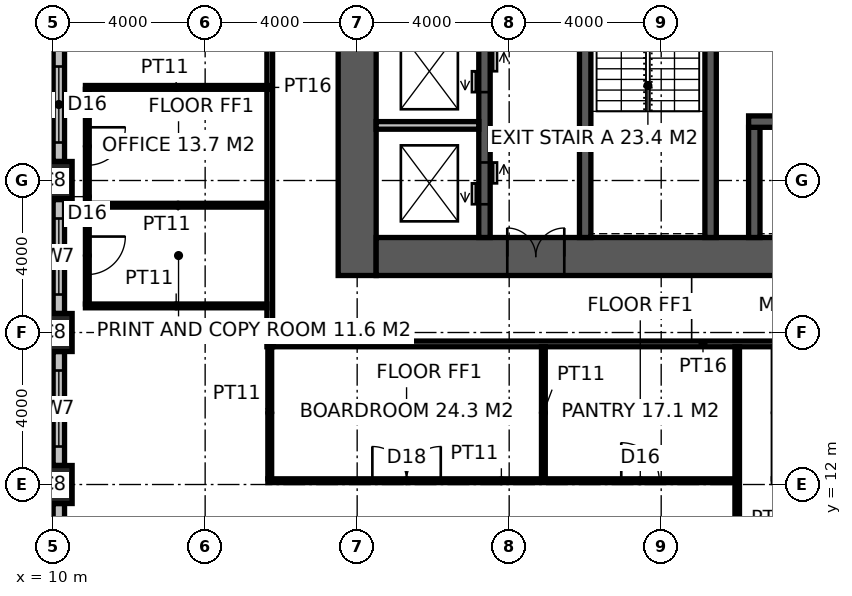
"""IFC4 building model, lengths in metres.
Left out: names, types, materials, properties, quantities, classifications, styles, units other than length and angle.
Written with IfcOpenShell. Run it as: python <this file> out.ifc"""

import sys

from ifc_helpers import new_model, si_unit, direction, frame, frame_2d, origin, origin_2d, place, context, subcontext, project, spatial, rectangle, hollow_rectangle, extrude, element, fill, save


model = new_model("IFC4")
c1 = context("Model", 3, precision=1e-05, world=origin(), true_north=direction((0.0, 1.0)))
c2 = subcontext(c1, "Body", "Model", "MODEL_VIEW")
j1 = project(units=[si_unit("LENGTHUNIT", "METRE"), si_unit("PLANEANGLEUNIT", "RADIAN")], contexts=[c1])
p1 = place(None, origin())
s1 = spatial("IfcSite", under=j1, at=p1, CompositionType="ELEMENT")
p2 = place(p1, origin())
s2 = spatial("IfcBuilding", under=s1, at=p2, CompositionType="ELEMENT")
p3 = place(p2, frame((0.0, 0.0, 266.2)))
s3 = spatial("IfcBuildingStorey", under=s2, at=p3, CompositionType="ELEMENT", Elevation=266.2)
for number, where, z_axis, x_axis in (
    (1, (10.0, 12.0, 0.0), (0.0, 0.0, 1.0), (1.0, 0.0, 0.0)),
    (2, (10.0, 16.0, 0.0), (0.0, 0.0, 1.0), (1.0, 0.0, 0.0)),
    (3, (10.0, 20.0, 0.0), (0.0, 0.0, 1.0), (1.0, 0.0, 0.0)),
):
    element("IfcColumn", number, at=place(p3, frame(where, z_axis=z_axis, x_axis=x_axis)), inside=s3, PredefinedType="COLUMN", context=c2, shape_type="SweptSolid", body=[
        extrude(hollow_rectangle(XDim=1.0, YDim=1.0, WallThickness=0.125, at=origin_2d()), origin(), (0.0, 0.0, 1.0), 4.0),
    ])
p4 = place(p3, frame((18.0, 17.5, -0.15), z_axis=(0.0, 0.0, 1.0), x_axis=(0.0, 1.0, 0.0)))
e4 = element("IfcWall", 4, at=p4, inside=s3, PredefinedType="SHEAR", context=c2, shape_type="SweptSolid", body=[
    extrude(rectangle(XDim=19.0, YDim=1.0, at=frame_2d((9.5, 0.0))), origin(), (0.0, 0.0, 1.0), 4.0),
])
p5 = place(p3, frame((18.5, 18.0, -0.15), z_axis=(0.0, 0.0, 1.0), x_axis=(1.0, 0.0, 0.0)))
e5 = element("IfcWall", 5, at=p5, inside=s3, PredefinedType="SHEAR", context=c2, shape_type="SweptSolid", body=[
    extrude(rectangle(XDim=17.6, YDim=1.0, at=frame_2d((8.8, 0.0))), origin(), (0.0, 0.0, 1.0), 4.0),
])
p6 = place(p5, frame((3.45, 0.0, 0.15)))
e6 = element("IfcOpeningElement", 6, at=p6, cuts=e5, PredefinedType="OPENING", context=c2, shape_type="SweptSolid", body=[
    extrude(rectangle(XDim=1.5, YDim=2.4, at=frame_2d((0.75, 1.2))), frame((0.0, 0.51, 0.0), z_axis=(0.0, -1.0, 0.0), x_axis=(1.0, 0.0, 0.0)), (0.0, 0.0, 1.0), 1.02),
])
p7 = place(p3, frame((24.0, 18.5, -0.15), z_axis=(0.0, 0.0, 1.0), x_axis=(0.0, 1.0, 0.0)))
e7 = element("IfcWall", 7, at=p7, inside=s3, PredefinedType="SHEAR", context=c2, shape_type="SweptSolid", body=[
    extrude(rectangle(XDim=17.0, YDim=0.3, at=frame_2d((8.5, 0.0))), origin(), (0.0, 0.0, 1.0), 4.0),
])
p8 = place(p7, frame((9.6, 0.0, 0.15)))
e8 = element("IfcOpeningElement", 8, at=p8, cuts=e7, PredefinedType="OPENING", context=c2, shape_type="SweptSolid", body=[
    extrude(rectangle(XDim=1.5, YDim=2.4, at=frame_2d((0.75, 1.2))), frame((0.0, 0.16, 0.0), z_axis=(0.0, -1.0, 0.0), x_axis=(1.0, 0.0, 0.0)), (0.0, 0.0, 1.0), 0.32),
])
p9 = place(p3, frame((27.3, 18.5, -0.15), z_axis=(0.0, 0.0, 1.0), x_axis=(0.0, 1.0, 0.0)))
e9 = element("IfcWall", 9, at=p9, inside=s3, PredefinedType="SHEAR", context=c2, shape_type="SweptSolid", body=[
    extrude(rectangle(XDim=7.9, YDim=0.3, at=frame_2d((3.95, 0.0))), origin(), (0.0, 0.0, 1.0), 4.0),
])
p10 = place(p9, frame((6.4, 0.0, 0.15)))
e10 = element("IfcOpeningElement", 10, at=p10, cuts=e9, PredefinedType="OPENING", context=c2, shape_type="SweptSolid", body=[
    extrude(rectangle(XDim=1.0, YDim=2.2, at=frame_2d((0.5, 1.1))), frame((0.0, 0.16, 0.0), z_axis=(0.0, -1.0, 0.0), x_axis=(1.0, 0.0, 0.0)), (0.0, 0.0, 1.0), 0.32),
])
p11 = place(p3, frame((28.45, 18.5, -0.15), z_axis=(0.0, 0.0, 1.0), x_axis=(0.0, 1.0, 0.0)))
e11 = element("IfcWall", 11, at=p11, inside=s3, PredefinedType="SHEAR", context=c2, shape_type="SweptSolid", body=[
    extrude(rectangle(XDim=2.9, YDim=0.3, at=frame_2d((1.45, 0.0))), origin(), (0.0, 0.0, 1.0), 4.0),
])
p12 = place(p3, frame((28.3, 21.55, -0.15), z_axis=(0.0, 0.0, 1.0), x_axis=(1.0, 0.0, 0.0)))
e12 = element("IfcWall", 12, at=p12, inside=s3, PredefinedType="SHEAR", context=c2, shape_type="SweptSolid", body=[
    extrude(rectangle(XDim=3.8, YDim=0.3, at=frame_2d((1.9, 0.0))), origin(), (0.0, 0.0, 1.0), 4.0),
])
p13 = place(p12, frame((1.05, 0.0, 0.15)))
e13 = element("IfcOpeningElement", 13, at=p13, cuts=e12, PredefinedType="OPENING", context=c2, shape_type="SweptSolid", body=[
    extrude(rectangle(XDim=1.3, YDim=2.4, at=frame_2d((0.65, 1.2))), frame((0.0, 0.16, 0.0), z_axis=(0.0, -1.0, 0.0), x_axis=(1.0, 0.0, 0.0)), (0.0, 0.0, 1.0), 0.32),
])
p14 = place(p3, frame((21.35, 18.5, -0.15), z_axis=(0.0, 0.0, 1.0), x_axis=(0.0, 1.0, 0.0)))
e14 = element("IfcWall", 14, at=p14, inside=s3, PredefinedType="SHEAR", context=c2, shape_type="SweptSolid", body=[
    extrude(rectangle(XDim=12.5, YDim=0.3, at=frame_2d((6.25, 0.0))), origin(), (0.0, 0.0, 1.0), 4.0),
])
p15 = place(p14, frame((0.875, 0.0, 0.15)))
e15 = element("IfcOpeningElement", 15, at=p15, cuts=e14, PredefinedType="OPENING", context=c2, shape_type="SweptSolid", body=[
    extrude(rectangle(XDim=1.1, YDim=2.2, at=frame_2d((0.55, 1.1))), frame((0.0, 0.16, 0.0), z_axis=(0.0, -1.0, 0.0), x_axis=(1.0, 0.0, 0.0)), (0.0, 0.0, 1.0), 0.32),
])
p16 = place(p14, frame((3.825, 0.0, 0.15)))
e16 = element("IfcOpeningElement", 16, at=p16, cuts=e14, PredefinedType="OPENING", context=c2, shape_type="SweptSolid", body=[
    extrude(rectangle(XDim=1.1, YDim=2.2, at=frame_2d((0.55, 1.1))), frame((0.0, 0.16, 0.0), z_axis=(0.0, -1.0, 0.0), x_axis=(1.0, 0.0, 0.0)), (0.0, 0.0, 1.0), 0.32),
])
p17 = place(p14, frame((6.675, 0.0, 0.15)))
e17 = element("IfcOpeningElement", 17, at=p17, cuts=e14, PredefinedType="OPENING", context=c2, shape_type="SweptSolid", body=[
    extrude(rectangle(XDim=1.1, YDim=2.2, at=frame_2d((0.55, 1.1))), frame((0.0, 0.16, 0.0), z_axis=(0.0, -1.0, 0.0), x_axis=(1.0, 0.0, 0.0)), (0.0, 0.0, 1.0), 0.32),
])
p18 = place(p14, frame((9.575, 0.0, 0.15)))
e18 = element("IfcOpeningElement", 18, at=p18, cuts=e14, PredefinedType="OPENING", context=c2, shape_type="SweptSolid", body=[
    extrude(rectangle(XDim=1.1, YDim=2.2, at=frame_2d((0.55, 1.1))), frame((0.0, 0.16, 0.0), z_axis=(0.0, -1.0, 0.0), x_axis=(1.0, 0.0, 0.0)), (0.0, 0.0, 1.0), 0.32),
])
p19 = place(p3, frame((18.5, 21.45, -0.15), z_axis=(0.0, 0.0, 1.0), x_axis=(1.0, 0.0, 0.0)))
e19 = element("IfcWall", 19, at=p19, inside=s3, PredefinedType="SOLIDWALL", context=c2, shape_type="SweptSolid", body=[
    extrude(rectangle(XDim=2.7, YDim=0.2, at=frame_2d((1.35, 0.0))), origin(), (0.0, 0.0, 1.0), 4.0),
])
p20 = place(p3, frame((15.7, 15.625, 0.0), z_axis=(0.0, 0.0, 1.0), x_axis=(0.0, 1.0, 0.0)))
e20 = element("IfcWall", 20, at=p20, inside=s3, PredefinedType="PARTITIONING", context=c2, shape_type="SweptSolid", body=[
    extrude(rectangle(XDim=22.75, YDim=0.15, at=frame_2d((11.375, 0.0))), origin(), (0.0, 0.0, 1.0), 3.85),
])
p21 = place(p20, frame((10.475, 0.0, 0.0)))
e21 = element("IfcOpeningElement", 21, at=p21, cuts=e20, PredefinedType="OPENING", context=c2, shape_type="SweptSolid", body=[
    extrude(rectangle(XDim=1.8, YDim=2.4, at=frame_2d((0.9, 1.2))), frame((0.0, 0.085, 0.0), z_axis=(0.0, -1.0, 0.0), x_axis=(1.0, 0.0, 0.0)), (0.0, 0.0, 1.0), 0.17),
])
p22 = place(p3, frame((15.775, 15.7, 0.0), z_axis=(0.0, 0.0, 1.0), x_axis=(1.0, 0.0, 0.0)))
e22 = element("IfcWall", 22, at=p22, inside=s3, PredefinedType="PARTITIONING", context=c2, shape_type="SweptSolid", body=[
    extrude(rectangle(XDim=22.65, YDim=0.15, at=frame_2d((11.325, 0.0))), origin(), (0.0, 0.0, 1.0), 3.85),
])
p23 = place(p3, frame((28.0, 4.3, 0.0), z_axis=(0.0, 0.0, 1.0), x_axis=(0.0, 1.0, 0.0)))
e23 = element("IfcWall", 23, at=p23, inside=s3, PredefinedType="PARTITIONING", context=c2, shape_type="SweptSolid", body=[
    extrude(rectangle(XDim=11.325, YDim=0.12, at=frame_2d((5.663, 0.0))), origin(), (0.0, 0.0, 1.0), 3.85),
])
p24 = place(p3, frame((15.65, 12.1, 0.0), z_axis=(0.0, 0.0, 1.0), x_axis=(1.0, 0.0, 0.0)))
e24 = element("IfcWall", 24, at=p24, inside=s3, PredefinedType="PARTITIONING", context=c2, shape_type="SweptSolid", body=[
    extrude(rectangle(XDim=12.289, YDim=0.1, at=frame_2d((6.145, 0.0))), origin(), (0.0, 0.0, 1.0), 3.85),
])
p25 = place(p24, frame((2.75, 0.0, 0.0)))
e25 = element("IfcOpeningElement", 25, at=p25, cuts=e24, PredefinedType="OPENING", context=c2, shape_type="SweptSolid", body=[
    extrude(rectangle(XDim=1.8, YDim=2.4, at=frame_2d((0.9, 1.2))), frame((0.0, 0.06, 0.0), z_axis=(0.0, -1.0, 0.0), x_axis=(1.0, 0.0, 0.0)), (0.0, 0.0, 1.0), 0.12),
])
p26 = place(p24, frame((9.3, 0.0, 0.0)))
e26 = element("IfcOpeningElement", 26, at=p26, cuts=e24, PredefinedType="OPENING", context=c2, shape_type="SweptSolid", body=[
    extrude(rectangle(XDim=1.0, YDim=2.2, at=frame_2d((0.5, 1.1))), frame((0.0, 0.06, 0.0), z_axis=(0.0, -1.0, 0.0), x_axis=(1.0, 0.0, 0.0)), (0.0, 0.0, 1.0), 0.12),
])
p27 = place(p3, frame((10.85, 16.7, 0.0), z_axis=(0.0, 0.0, 1.0), x_axis=(1.0, 0.0, 0.0)))
e27 = element("IfcWall", 27, at=p27, inside=s3, PredefinedType="PARTITIONING", context=c2, shape_type="SweptSolid", body=[
    extrude(rectangle(XDim=4.775, YDim=0.1, at=frame_2d((2.387, 0.0))), origin(), (0.0, 0.0, 1.0), 3.85),
])
p28 = place(p3, frame((10.95, 19.35, 0.0), z_axis=(0.0, 0.0, 1.0), x_axis=(1.0, 0.0, 0.0)))
e28 = element("IfcWall", 28, at=p28, inside=s3, PredefinedType="PARTITIONING", context=c2, shape_type="SweptSolid", body=[
    extrude(rectangle(XDim=4.675, YDim=0.1, at=frame_2d((2.337, 0.0))), origin(), (0.0, 0.0, 1.0), 3.85),
])
p29 = place(p3, frame((10.85, 22.45, 0.0), z_axis=(0.0, 0.0, 1.0), x_axis=(1.0, 0.0, 0.0)))
e29 = element("IfcWall", 29, at=p29, inside=s3, PredefinedType="PARTITIONING", context=c2, shape_type="SweptSolid", body=[
    extrude(rectangle(XDim=4.775, YDim=0.1, at=frame_2d((2.387, 0.0))), origin(), (0.0, 0.0, 1.0), 3.85),
])
p30 = place(p3, frame((10.9, 16.75, 0.0), z_axis=(0.0, 0.0, 1.0), x_axis=(0.0, 1.0, 0.0)))
e30 = element("IfcWall", 30, at=p30, inside=s3, PredefinedType="PARTITIONING", context=c2, shape_type="SweptSolid", body=[
    extrude(rectangle(XDim=5.65, YDim=0.1, at=frame_2d((2.825, 0.0))), origin(), (0.0, 0.0, 1.0), 3.85),
])
p31 = place(p30, frame((0.775, 0.0, 0.0)))
e31 = element("IfcOpeningElement", 31, at=p31, cuts=e30, PredefinedType="OPENING", context=c2, shape_type="SweptSolid", body=[
    extrude(rectangle(XDim=1.0, YDim=2.2, at=frame_2d((0.5, 1.1))), frame((0.0, 0.06, 0.0), z_axis=(0.0, -1.0, 0.0), x_axis=(1.0, 0.0, 0.0)), (0.0, 0.0, 1.0), 0.12),
])
p32 = place(p30, frame((3.65, 0.0, 0.0)))
e32 = element("IfcOpeningElement", 32, at=p32, cuts=e30, PredefinedType="OPENING", context=c2, shape_type="SweptSolid", body=[
    extrude(rectangle(XDim=1.0, YDim=2.2, at=frame_2d((0.5, 1.1))), frame((0.0, 0.06, 0.0), z_axis=(0.0, -1.0, 0.0), x_axis=(1.0, 0.0, 0.0)), (0.0, 0.0, 1.0), 0.12),
])
for number, where, z_axis, x_axis in (
    (33, (15.7, 12.15, 0.0), (0.0, 0.0, 1.0), (0.0, 1.0, 0.0)),
    (34, (22.9, 12.15, 0.0), (0.0, 0.0, 1.0), (0.0, 1.0, 0.0)),
):
    element("IfcWall", number, at=place(p3, frame(where, z_axis=z_axis, x_axis=x_axis)), inside=s3, PredefinedType="PARTITIONING", context=c2, shape_type="SweptSolid", body=[
        extrude(rectangle(XDim=3.475, YDim=0.1, at=frame_2d((1.738, 0.0))), origin(), (0.0, 0.0, 1.0), 3.85),
    ])
p33 = place(p3, frame((10.15, 11.5, 0.0), z_axis=(0.0, 0.0, 1.0), x_axis=(0.0, -1.0, 0.0)))
e35 = element("IfcWall", 35, at=p33, inside=s3, PredefinedType="ELEMENTEDWALL", context=c2, shape_type="SweptSolid", body=[
    extrude(rectangle(XDim=3.0, YDim=0.3, at=frame_2d((1.5, 0.0))), origin(), (0.0, 0.0, 1.0), 2.65),
])
p34 = place(p33, frame((0.5, 0.0, 0.8)))
e36 = element("IfcOpeningElement", 36, at=p34, cuts=e35, PredefinedType="OPENING", context=c2, shape_type="SweptSolid", body=[
    extrude(rectangle(XDim=2.0, YDim=1.8, at=frame_2d((1.0, 0.9))), frame((0.0, 0.16, 0.0), z_axis=(0.0, -1.0, 0.0), x_axis=(1.0, 0.0, 0.0)), (0.0, 0.0, 1.0), 0.32),
])
p35 = place(p3, frame((10.15, 15.5, 0.0), z_axis=(0.0, 0.0, 1.0), x_axis=(0.0, -1.0, 0.0)))
e37 = element("IfcWall", 37, at=p35, inside=s3, PredefinedType="ELEMENTEDWALL", context=c2, shape_type="SweptSolid", body=[
    extrude(rectangle(XDim=3.0, YDim=0.3, at=frame_2d((1.5, 0.0))), origin(), (0.0, 0.0, 1.0), 2.65),
])
p36 = place(p35, frame((0.5, 0.0, 0.8)))
e38 = element("IfcOpeningElement", 38, at=p36, cuts=e37, PredefinedType="OPENING", context=c2, shape_type="SweptSolid", body=[
    extrude(rectangle(XDim=2.0, YDim=1.8, at=frame_2d((1.0, 0.9))), frame((0.0, 0.16, 0.0), z_axis=(0.0, -1.0, 0.0), x_axis=(1.0, 0.0, 0.0)), (0.0, 0.0, 1.0), 0.32),
])
p37 = place(p3, frame((10.15, 19.5, 0.0), z_axis=(0.0, 0.0, 1.0), x_axis=(0.0, -1.0, 0.0)))
e39 = element("IfcWall", 39, at=p37, inside=s3, PredefinedType="ELEMENTEDWALL", context=c2, shape_type="SweptSolid", body=[
    extrude(rectangle(XDim=3.0, YDim=0.3, at=frame_2d((1.5, 0.0))), origin(), (0.0, 0.0, 1.0), 2.65),
])
p38 = place(p37, frame((0.5, 0.0, 0.8)))
e40 = element("IfcOpeningElement", 40, at=p38, cuts=e39, PredefinedType="OPENING", context=c2, shape_type="SweptSolid", body=[
    extrude(rectangle(XDim=2.0, YDim=1.8, at=frame_2d((1.0, 0.9))), frame((0.0, 0.16, 0.0), z_axis=(0.0, -1.0, 0.0), x_axis=(1.0, 0.0, 0.0)), (0.0, 0.0, 1.0), 0.32),
])
p39 = place(p3, frame((10.15, 23.5, 0.0), z_axis=(0.0, 0.0, 1.0), x_axis=(0.0, -1.0, 0.0)))
e41 = element("IfcWall", 41, at=p39, inside=s3, PredefinedType="ELEMENTEDWALL", context=c2, shape_type="SweptSolid", body=[
    extrude(rectangle(XDim=3.0, YDim=0.3, at=frame_2d((1.5, 0.0))), origin(), (0.0, 0.0, 1.0), 2.65),
])
p40 = place(p39, frame((0.5, 0.0, 0.8)))
e42 = element("IfcOpeningElement", 42, at=p40, cuts=e41, PredefinedType="OPENING", context=c2, shape_type="SweptSolid", body=[
    extrude(rectangle(XDim=2.0, YDim=1.8, at=frame_2d((1.0, 0.9))), frame((0.0, 0.16, 0.0), z_axis=(0.0, -1.0, 0.0), x_axis=(1.0, 0.0, 0.0)), (0.0, 0.0, 1.0), 0.32),
])
p41 = place(p6, origin())
e43 = element("IfcDoor", 43, at=p41, inside=s3, OperationType="DOUBLE_DOOR_DOUBLE_SWING", PredefinedType="DOOR", context=c2, shape_type="SweptSolid", body=[
    extrude(rectangle(XDim=1.5, YDim=2.4, at=frame_2d((0.75, 1.2))), frame((0.0, 0.025, 0.0), z_axis=(0.0, -1.0, 0.0), x_axis=(1.0, 0.0, 0.0)), (0.0, 0.0, 1.0), 0.05),
])
fill(e6, e43)
p42 = place(p25, origin())
e44 = element("IfcDoor", 44, at=p42, inside=s3, OperationType="DOUBLE_DOOR_DOUBLE_SWING", PredefinedType="DOOR", context=c2, shape_type="SweptSolid", body=[
    extrude(rectangle(XDim=1.8, YDim=2.4, at=frame_2d((0.9, 1.2))), frame((0.0, 0.025, 0.0), z_axis=(0.0, -1.0, 0.0), x_axis=(1.0, 0.0, 0.0)), (0.0, 0.0, 1.0), 0.05),
])
fill(e25, e44)
p43 = place(p26, origin())
e45 = element("IfcDoor", 45, at=p43, inside=s3, OperationType="SINGLE_SWING_LEFT", PredefinedType="DOOR", context=c2, shape_type="SweptSolid", body=[
    extrude(rectangle(XDim=1.0, YDim=2.2, at=frame_2d((0.5, 1.1))), frame((0.0, 0.025, 0.0), z_axis=(0.0, -1.0, 0.0), x_axis=(1.0, 0.0, 0.0)), (0.0, 0.0, 1.0), 0.05),
])
fill(e26, e45)
p44 = place(p31, frame((1.0, 0.0, 0.0), z_axis=(0.0, 0.0, 1.0), x_axis=(-1.0, 0.0, 0.0)))
e46 = element("IfcDoor", 46, at=p44, inside=s3, OperationType="SINGLE_SWING_LEFT", PredefinedType="DOOR", context=c2, shape_type="SweptSolid", body=[
    extrude(rectangle(XDim=1.0, YDim=2.2, at=frame_2d((0.5, 1.1))), frame((0.0, 0.025, 0.0), z_axis=(0.0, -1.0, 0.0), x_axis=(1.0, 0.0, 0.0)), (0.0, 0.0, 1.0), 0.05),
])
fill(e31, e46)
p45 = place(p32, frame((1.0, 0.0, 0.0), z_axis=(0.0, 0.0, 1.0), x_axis=(-1.0, 0.0, 0.0)))
e47 = element("IfcDoor", 47, at=p45, inside=s3, OperationType="SINGLE_SWING_LEFT", PredefinedType="DOOR", context=c2, shape_type="SweptSolid", body=[
    extrude(rectangle(XDim=1.0, YDim=2.2, at=frame_2d((0.5, 1.1))), frame((0.0, 0.025, 0.0), z_axis=(0.0, -1.0, 0.0), x_axis=(1.0, 0.0, 0.0)), (0.0, 0.0, 1.0), 0.05),
])
fill(e32, e47)
p46 = place(p15, origin())
e48 = element("IfcDoor", 48, at=p46, inside=s3, OperationType="DOUBLE_DOOR_SLIDING", PredefinedType="DOOR", context=c2, shape_type="SweptSolid", body=[
    extrude(rectangle(XDim=1.1, YDim=2.2, at=frame_2d((0.55, 1.1))), frame((0.0, 0.025, 0.0), z_axis=(0.0, -1.0, 0.0), x_axis=(1.0, 0.0, 0.0)), (0.0, 0.0, 1.0), 0.05),
])
fill(e15, e48)
p47 = place(p16, origin())
e49 = element("IfcDoor", 49, at=p47, inside=s3, OperationType="DOUBLE_DOOR_SLIDING", PredefinedType="DOOR", context=c2, shape_type="SweptSolid", body=[
    extrude(rectangle(XDim=1.1, YDim=2.2, at=frame_2d((0.55, 1.1))), frame((0.0, 0.025, 0.0), z_axis=(0.0, -1.0, 0.0), x_axis=(1.0, 0.0, 0.0)), (0.0, 0.0, 1.0), 0.05),
])
fill(e16, e49)
p48 = place(p36, origin())
e50 = element("IfcWindow", 50, at=p48, inside=s3, PartitioningType="SINGLE_PANEL", PredefinedType="WINDOW", context=c2, shape_type="SweptSolid", body=[
    extrude(rectangle(XDim=2.0, YDim=1.8, at=frame_2d((1.0, 0.9))), frame((0.0, 0.03, 0.0), z_axis=(0.0, -1.0, 0.0), x_axis=(1.0, 0.0, 0.0)), (0.0, 0.0, 1.0), 0.06),
])
fill(e38, e50)
p49 = place(p38, origin())
e51 = element("IfcWindow", 51, at=p49, inside=s3, PartitioningType="SINGLE_PANEL", PredefinedType="WINDOW", context=c2, shape_type="SweptSolid", body=[
    extrude(rectangle(XDim=2.0, YDim=1.8, at=frame_2d((1.0, 0.9))), frame((0.0, 0.03, 0.0), z_axis=(0.0, -1.0, 0.0), x_axis=(1.0, 0.0, 0.0)), (0.0, 0.0, 1.0), 0.06),
])
fill(e40, e51)
p50 = place(p40, origin())
e52 = element("IfcWindow", 52, at=p50, inside=s3, PartitioningType="SINGLE_PANEL", PredefinedType="WINDOW", context=c2, shape_type="SweptSolid", body=[
    extrude(rectangle(XDim=2.0, YDim=1.8, at=frame_2d((1.0, 0.9))), frame((0.0, 0.03, 0.0), z_axis=(0.0, -1.0, 0.0), x_axis=(1.0, 0.0, 0.0)), (0.0, 0.0, 1.0), 0.06),
])
fill(e42, e52)
save(model, sys.argv[1])
